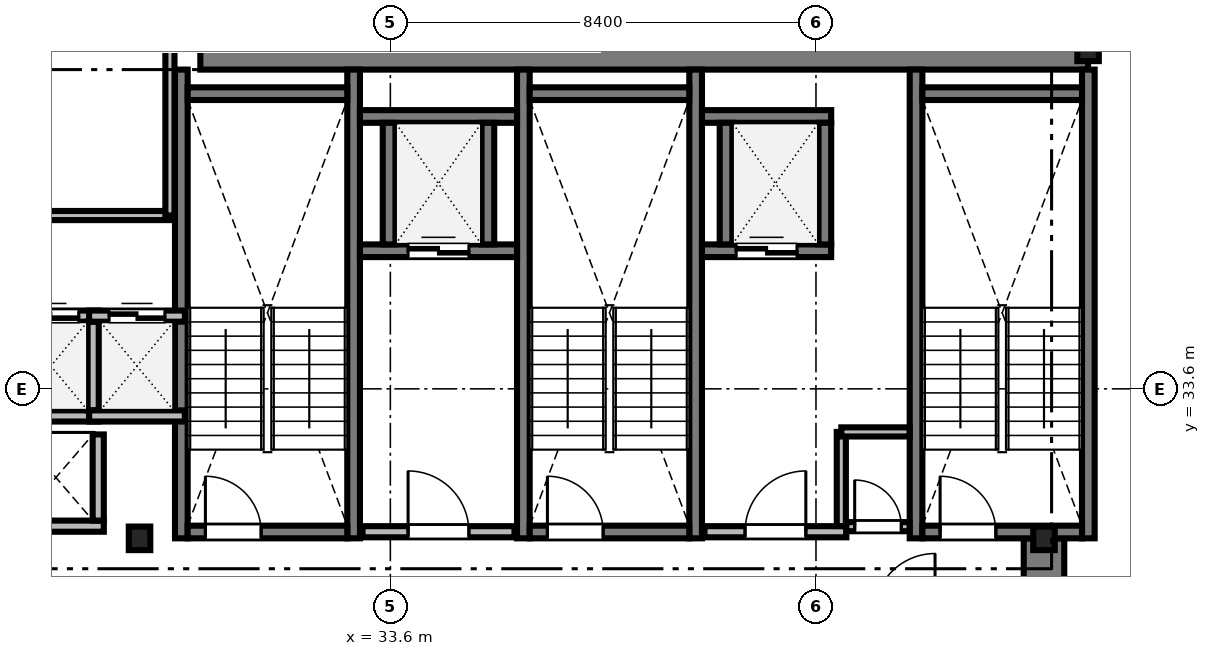
"""IFC4 building model, lengths in metres.
Left out: names, types, materials, properties, quantities, classifications, styles, units other than length and angle.
Written with IfcOpenShell. Run it as: python <this file> out.ifc"""

import sys

from ifc_helpers import new_model, si_unit, direction, frame, frame_2d, origin, origin_2d, place, context, subcontext, project, spatial, rectangle, i_section, extrude, source, transform, mapped, element, fill, save


model = new_model("IFC4")
c1 = context("Model", 3, precision=1e-05, world=origin(), true_north=direction((0.0, 1.0)))
c2 = subcontext(c1, "Body", "Model", "MODEL_VIEW")
j1 = project(units=[si_unit("LENGTHUNIT", "METRE"), si_unit("PLANEANGLEUNIT", "RADIAN")], contexts=[c1])
p1 = place(None, origin())
s1 = spatial("IfcSite", under=j1, at=p1, CompositionType="ELEMENT")
p2 = place(p1, origin())
s2 = spatial("IfcBuilding", under=s1, at=p2, CompositionType="ELEMENT")
p3 = place(p2, frame((0.0, 0.0, 137.2)))
s3 = spatial("IfcBuildingStorey", under=s2, at=p3, CompositionType="ELEMENT", Elevation=137.2)
m1 = source(origin(), c2, "Body", "SweptSolid", [
    extrude(rectangle(XDim=17.52, YDim=0.8, at=frame_2d((8.76, 0.0))), origin(), (0.0, 0.0, 1.0), 3.46),
])
p4 = place(p3, frame((29.85, 40.3, 0.0), z_axis=(0.0, 0.0, 1.0), x_axis=(1.0, 0.0, 0.0)))
e1 = element("IfcWall", 1, at=p4, inside=s3, PredefinedType="SHEAR", context=c2, shape_type="MappedRepresentation", body=[
    mapped(m1, transform((0.0, 0.0, 0.0), scale=1.0)),
])
m2 = source(origin(), c2, "Body", "SweptSolid", [
    extrude(rectangle(XDim=13.15, YDim=0.8, at=frame_2d((6.575, 0.0))), origin(), (0.0, 0.0, 1.0), 3.46),
])
p5 = place(p3, frame((46.5, 17.5, 0.0), z_axis=(0.0, 0.0, 1.0), x_axis=(0.0, 1.0, 0.0)))
e2 = element("IfcWall", 2, at=p5, inside=s3, PredefinedType="SHEAR", context=c2, shape_type="MappedRepresentation", body=[
    mapped(m2, transform((0.0, 0.0, 0.0), scale=1.0)),
])
m3 = source(origin(), c2, "Body", "SweptSolid", [
    extrude(i_section(OverallWidth=0.424, OverallDepth=0.465, WebThickness=0.035, FlangeThickness=0.056, FilletRadius=0.015, at=origin_2d()), origin(), (0.0, 0.0, 1.0), 3.46),
])
for number, where, z_axis, x_axis in (
    (3, (28.65, 30.65, 0.0), (0.0, 0.0, 1.0), (1.0, 0.0, 0.0)),
    (4, (46.5, 30.65, 0.0), (0.0, 0.0, 1.0), (1.0, 0.0, 0.0)),
    (5, (47.37, 40.3, 0.0), (0.0, 0.0, 1.0), (1.0, 0.0, 0.0)),
):
    element("IfcColumn", number, at=place(p3, frame(where, z_axis=z_axis, x_axis=x_axis)), inside=s3, PredefinedType="COLUMN", context=c2, shape_type="MappedRepresentation", body=[
        mapped(m3, transform((0.0, 0.0, 0.0), scale=1.0)),
    ])
m4 = source(origin(), c2, "Body", "SweptSolid", [
    extrude(rectangle(XDim=9.25, YDim=0.25, at=frame_2d((4.625, 0.0))), origin(), (0.0, 0.0, 1.0), 3.5),
])
for number, where, z_axis, x_axis in (
    (6, (29.475, 30.65, 0.0), (0.0, 0.0, 1.0), (0.0, 1.0, 0.0)),
    (7, (32.875, 30.65, 0.0), (0.0, 0.0, 1.0), (0.0, 1.0, 0.0)),
):
    element("IfcWall", number, at=place(p3, frame(where, z_axis=z_axis, x_axis=x_axis)), inside=s3, PredefinedType="SOLIDWALL", context=c2, shape_type="MappedRepresentation", body=[
        mapped(m4, transform((0.0, 0.0, 0.0), scale=1.0)),
    ])
m5 = source(origin(), c2, "Body", "SweptSolid", [
    extrude(rectangle(XDim=3.15, YDim=0.25, at=frame_2d((1.575, 0.0))), origin(), (0.0, 0.0, 1.0), 3.5),
])
p6 = place(p3, frame((29.6, 39.425, 0.0), z_axis=(0.0, 0.0, 1.0), x_axis=(1.0, 0.0, 0.0)))
e8 = element("IfcWall", 8, at=p6, inside=s3, PredefinedType="SOLIDWALL", context=c2, shape_type="MappedRepresentation", body=[
    mapped(m5, transform((0.0, 0.0, 0.0), scale=1.0)),
])
p7 = place(p3, frame((29.6, 30.775, 0.0), z_axis=(0.0, 0.0, 1.0), x_axis=(1.0, 0.0, 0.0)))
e9 = element("IfcWall", 9, at=p7, inside=s3, PredefinedType="SOLIDWALL", context=c2, shape_type="MappedRepresentation", body=[
    mapped(m5, transform((0.0, 0.0, 0.0), scale=1.0)),
])
m6 = source(origin(), c2, "Body", "SweptSolid", [
    extrude(rectangle(XDim=1.1, YDim=2.2, at=frame_2d((0.55, 1.1))), frame((0.0, 0.135, 0.0), z_axis=(0.0, -1.0, 0.0), x_axis=(1.0, 0.0, 0.0)), (0.0, 0.0, 1.0), 0.27),
])
p8 = place(p7, frame((0.35, 0.0, 0.0)))
e10 = element("IfcOpeningElement", 10, at=p8, cuts=e9, PredefinedType="OPENING", context=c2, shape_type="MappedRepresentation", body=[
    mapped(m6, transform((0.0, 0.0, 0.0), scale=1.0)),
])
for number, where, z_axis, x_axis in (
    (11, (36.225, 30.65, 0.0), (0.0, 0.0, 1.0), (0.0, 1.0, 0.0)),
    (12, (39.625, 30.65, 0.0), (0.0, 0.0, 1.0), (0.0, 1.0, 0.0)),
):
    element("IfcWall", number, at=place(p3, frame(where, z_axis=z_axis, x_axis=x_axis)), inside=s3, PredefinedType="SOLIDWALL", context=c2, shape_type="MappedRepresentation", body=[
        mapped(m4, transform((0.0, 0.0, 0.0), scale=1.0)),
    ])
p9 = place(p3, frame((36.35, 39.425, 0.0), z_axis=(0.0, 0.0, 1.0), x_axis=(1.0, 0.0, 0.0)))
e13 = element("IfcWall", 13, at=p9, inside=s3, PredefinedType="SOLIDWALL", context=c2, shape_type="MappedRepresentation", body=[
    mapped(m5, transform((0.0, 0.0, 0.0), scale=1.0)),
])
p10 = place(p3, frame((36.35, 30.775, 0.0), z_axis=(0.0, 0.0, 1.0), x_axis=(1.0, 0.0, 0.0)))
e14 = element("IfcWall", 14, at=p10, inside=s3, PredefinedType="SOLIDWALL", context=c2, shape_type="MappedRepresentation", body=[
    mapped(m5, transform((0.0, 0.0, 0.0), scale=1.0)),
])
p11 = place(p10, frame((0.35, 0.0, 0.0)))
e15 = element("IfcOpeningElement", 15, at=p11, cuts=e14, PredefinedType="OPENING", context=c2, shape_type="MappedRepresentation", body=[
    mapped(m6, transform((0.0, 0.0, 0.0), scale=1.0)),
])
for number, where, z_axis, x_axis in (
    (16, (43.975, 30.65, 0.0), (0.0, 0.0, 1.0), (0.0, 1.0, 0.0)),
    (17, (47.375, 30.65, 0.0), (0.0, 0.0, 1.0), (0.0, 1.0, 0.0)),
):
    element("IfcWall", number, at=place(p3, frame(where, z_axis=z_axis, x_axis=x_axis)), inside=s3, PredefinedType="SOLIDWALL", context=c2, shape_type="MappedRepresentation", body=[
        mapped(m4, transform((0.0, 0.0, 0.0), scale=1.0)),
    ])
p12 = place(p3, frame((44.1, 39.425, 0.0), z_axis=(0.0, 0.0, 1.0), x_axis=(1.0, 0.0, 0.0)))
e18 = element("IfcWall", 18, at=p12, inside=s3, PredefinedType="SOLIDWALL", context=c2, shape_type="MappedRepresentation", body=[
    mapped(m5, transform((0.0, 0.0, 0.0), scale=1.0)),
])
p13 = place(p3, frame((44.1, 30.775, 0.0), z_axis=(0.0, 0.0, 1.0), x_axis=(1.0, 0.0, 0.0)))
e19 = element("IfcWall", 19, at=p13, inside=s3, PredefinedType="SOLIDWALL", context=c2, shape_type="MappedRepresentation", body=[
    mapped(m5, transform((0.0, 0.0, 0.0), scale=1.0)),
])
p14 = place(p13, frame((0.35, 0.0, 0.0)))
e20 = element("IfcOpeningElement", 20, at=p14, cuts=e19, PredefinedType="OPENING", context=c2, shape_type="MappedRepresentation", body=[
    mapped(m6, transform((0.0, 0.0, 0.0), scale=1.0)),
])
m7 = source(origin(), c2, "Body", "SweptSolid", [
    extrude(rectangle(XDim=3.0, YDim=0.22, at=frame_2d((1.5, 0.0))), origin(), (0.0, 0.0, 1.0), 3.46),
])
p15 = place(p3, frame((33.05, 30.78, 0.0), z_axis=(0.0, 0.0, 1.0), x_axis=(1.0, 0.0, 0.0)))
e21 = element("IfcWall", 21, at=p15, inside=s3, PredefinedType="SOLIDWALL", context=c2, shape_type="MappedRepresentation", body=[
    mapped(m7, transform((0.0, 0.0, 0.0), scale=1.0)),
])
m8 = source(origin(), c2, "Body", "SweptSolid", [
    extrude(rectangle(XDim=1.2, YDim=2.2, at=frame_2d((0.6, 1.1))), frame((0.0, 0.12, 0.0), z_axis=(0.0, -1.0, 0.0), x_axis=(1.0, 0.0, 0.0)), (0.0, 0.0, 1.0), 0.24),
])
p16 = place(p15, frame((0.9, 0.0, 0.0)))
e22 = element("IfcOpeningElement", 22, at=p16, cuts=e21, PredefinedType="OPENING", context=c2, shape_type="MappedRepresentation", body=[
    mapped(m8, transform((0.0, 0.0, 0.0), scale=1.0)),
])
m9 = source(origin(), c2, "Body", "SweptSolid", [
    extrude(rectangle(XDim=2.8, YDim=0.22, at=frame_2d((1.4, 0.0))), origin(), (0.0, 0.0, 1.0), 3.46),
])
p17 = place(p3, frame((39.8, 30.78, 0.0), z_axis=(0.0, 0.0, 1.0), x_axis=(1.0, 0.0, 0.0)))
e23 = element("IfcWall", 23, at=p17, inside=s3, PredefinedType="SOLIDWALL", context=c2, shape_type="MappedRepresentation", body=[
    mapped(m9, transform((0.0, 0.0, 0.0), scale=1.0)),
])
p18 = place(p17, frame((0.8, 0.0, 0.0)))
e24 = element("IfcOpeningElement", 24, at=p18, cuts=e23, PredefinedType="OPENING", context=c2, shape_type="MappedRepresentation", body=[
    mapped(m8, transform((0.0, 0.0, 0.0), scale=1.0)),
])
m10 = source(origin(), c2, "Body", "SweptSolid", [
    extrude(rectangle(XDim=1.89, YDim=0.22, at=frame_2d((0.945, 0.0))), origin(), (0.0, 0.0, 1.0), 3.46),
])
p19 = place(p3, frame((25.955, 33.065, 0.0), z_axis=(0.0, 0.0, 1.0), x_axis=(1.0, 0.0, 0.0)))
e25 = element("IfcWall", 25, at=p19, inside=s3, PredefinedType="SOLIDWALL", context=c2, shape_type="MappedRepresentation", body=[
    mapped(m10, transform((0.0, 0.0, 0.0), scale=1.0)),
])
p20 = place(p3, frame((25.955, 35.035, 0.0), z_axis=(0.0, 0.0, 1.0), x_axis=(1.0, 0.0, 0.0)))
e26 = element("IfcWall", 26, at=p20, inside=s3, PredefinedType="SOLIDWALL", context=c2, shape_type="MappedRepresentation", body=[
    mapped(m10, transform((0.0, 0.0, 0.0), scale=1.0)),
])
m11 = source(origin(), c2, "Body", "SweptSolid", [
    extrude(rectangle(XDim=1.1, YDim=2.2, at=frame_2d((0.55, 1.1))), frame((0.0, 0.12, 0.0), z_axis=(0.0, -1.0, 0.0), x_axis=(1.0, 0.0, 0.0)), (0.0, 0.0, 1.0), 0.24),
])
p21 = place(p20, frame((0.395, 0.0, 0.0)))
e27 = element("IfcOpeningElement", 27, at=p21, cuts=e26, PredefinedType="OPENING", context=c2, shape_type="MappedRepresentation", body=[
    mapped(m11, transform((0.0, 0.0, 0.0), scale=1.0)),
])
m12 = source(origin(), c2, "Body", "SweptSolid", [
    extrude(rectangle(XDim=1.75, YDim=0.22, at=frame_2d((0.875, 0.0))), origin(), (0.0, 0.0, 1.0), 3.46),
])
p22 = place(p3, frame((27.735, 33.175, 0.0), z_axis=(0.0, 0.0, 1.0), x_axis=(0.0, 1.0, 0.0)))
e28 = element("IfcWall", 28, at=p22, inside=s3, PredefinedType="SOLIDWALL", context=c2, shape_type="MappedRepresentation", body=[
    mapped(m12, transform((0.0, 0.0, 0.0), scale=1.0)),
])
p23 = place(p3, frame((27.655, 33.065, 0.0), z_axis=(0.0, 0.0, 1.0), x_axis=(1.0, 0.0, 0.0)))
e29 = element("IfcWall", 29, at=p23, inside=s3, PredefinedType="SOLIDWALL", context=c2, shape_type="MappedRepresentation", body=[
    mapped(m10, transform((0.0, 0.0, 0.0), scale=1.0)),
])
p24 = place(p3, frame((27.655, 35.035, 0.0), z_axis=(0.0, 0.0, 1.0), x_axis=(1.0, 0.0, 0.0)))
e30 = element("IfcWall", 30, at=p24, inside=s3, PredefinedType="SOLIDWALL", context=c2, shape_type="MappedRepresentation", body=[
    mapped(m10, transform((0.0, 0.0, 0.0), scale=1.0)),
])
p25 = place(p24, frame((0.395, 0.0, 0.0)))
e31 = element("IfcOpeningElement", 31, at=p25, cuts=e30, PredefinedType="OPENING", context=c2, shape_type="MappedRepresentation", body=[
    mapped(m11, transform((0.0, 0.0, 0.0), scale=1.0)),
])
m13 = source(origin(), c2, "Body", "SweptSolid", [
    extrude(rectangle(XDim=3.1, YDim=0.25, at=frame_2d((1.55, 0.0))), origin(), (0.0, 0.0, 1.0), 3.46),
])
p26 = place(p3, frame((33.0, 36.325, 0.0), z_axis=(0.0, 0.0, 1.0), x_axis=(1.0, 0.0, 0.0)))
e32 = element("IfcWall", 32, at=p26, inside=s3, PredefinedType="SOLIDWALL", context=c2, shape_type="MappedRepresentation", body=[
    mapped(m13, transform((0.0, 0.0, 0.0), scale=1.0)),
])
m14 = source(origin(), c2, "Body", "SweptSolid", [
    extrude(rectangle(XDim=1.2, YDim=2.25, at=frame_2d((0.6, 1.125))), frame((0.0, 0.135, 0.0), z_axis=(0.0, -1.0, 0.0), x_axis=(1.0, 0.0, 0.0)), (0.0, 0.0, 1.0), 0.27),
])
p27 = place(p26, frame((0.95, 0.0, 0.0)))
e33 = element("IfcOpeningElement", 33, at=p27, cuts=e32, PredefinedType="OPENING", context=c2, shape_type="MappedRepresentation", body=[
    mapped(m14, transform((0.0, 0.0, 0.0), scale=1.0)),
])
p28 = place(p3, frame((33.0, 38.975, 0.0), z_axis=(0.0, 0.0, 1.0), x_axis=(1.0, 0.0, 0.0)))
e34 = element("IfcWall", 34, at=p28, inside=s3, PredefinedType="SOLIDWALL", context=c2, shape_type="MappedRepresentation", body=[
    mapped(m13, transform((0.0, 0.0, 0.0), scale=1.0)),
])
m15 = source(origin(), c2, "Body", "SweptSolid", [
    extrude(rectangle(XDim=2.4, YDim=0.25, at=frame_2d((1.2, 0.0))), origin(), (0.0, 0.0, 1.0), 3.46),
])
for number, where, z_axis, x_axis in (
    (35, (33.575, 36.45, 0.0), (0.0, 0.0, 1.0), (0.0, 1.0, 0.0)),
    (36, (35.525, 36.45, 0.0), (0.0, 0.0, 1.0), (0.0, 1.0, 0.0)),
):
    element("IfcWall", number, at=place(p3, frame(where, z_axis=z_axis, x_axis=x_axis)), inside=s3, PredefinedType="SOLIDWALL", context=c2, shape_type="MappedRepresentation", body=[
        mapped(m15, transform((0.0, 0.0, 0.0), scale=1.0)),
    ])
m16 = source(origin(), c2, "Body", "SweptSolid", [
    extrude(rectangle(XDim=2.55, YDim=0.25, at=frame_2d((1.275, 0.0))), origin(), (0.0, 0.0, 1.0), 3.46),
])
p29 = place(p3, frame((39.75, 36.325, 0.0), z_axis=(0.0, 0.0, 1.0), x_axis=(1.0, 0.0, 0.0)))
e37 = element("IfcWall", 37, at=p29, inside=s3, PredefinedType="SOLIDWALL", context=c2, shape_type="MappedRepresentation", body=[
    mapped(m16, transform((0.0, 0.0, 0.0), scale=1.0)),
])
p30 = place(p29, frame((0.675, 0.0, 0.0)))
e38 = element("IfcOpeningElement", 38, at=p30, cuts=e37, PredefinedType="OPENING", context=c2, shape_type="MappedRepresentation", body=[
    mapped(m14, transform((0.0, 0.0, 0.0), scale=1.0)),
])
p31 = place(p3, frame((39.75, 38.975, 0.0), z_axis=(0.0, 0.0, 1.0), x_axis=(1.0, 0.0, 0.0)))
e39 = element("IfcWall", 39, at=p31, inside=s3, PredefinedType="SOLIDWALL", context=c2, shape_type="MappedRepresentation", body=[
    mapped(m16, transform((0.0, 0.0, 0.0), scale=1.0)),
])
for number, where, z_axis, x_axis in (
    (40, (40.225, 36.45, 0.0), (0.0, 0.0, 1.0), (0.0, 1.0, 0.0)),
    (41, (42.175, 36.45, 0.0), (0.0, 0.0, 1.0), (0.0, 1.0, 0.0)),
):
    element("IfcWall", number, at=place(p3, frame(where, z_axis=z_axis, x_axis=x_axis)), inside=s3, PredefinedType="SOLIDWALL", context=c2, shape_type="MappedRepresentation", body=[
        mapped(m15, transform((0.0, 0.0, 0.0), scale=1.0)),
    ])
m17 = source(origin(), c2, "Body", "SweptSolid", [
    extrude(rectangle(XDim=1.89, YDim=0.22, at=frame_2d((0.945, 0.0))), origin(), (0.0, 0.0, 1.0), 3.46),
])
p32 = place(p3, frame((26.055, 30.89, 0.0), z_axis=(0.0, 0.0, 1.0), x_axis=(1.0, 0.0, 0.0)))
e42 = element("IfcWall", 42, at=p32, inside=s3, PredefinedType="SOLIDWALL", context=c2, shape_type="MappedRepresentation", body=[
    mapped(m17, transform((0.0, 0.0, 0.0), scale=1.0)),
])
m18 = source(origin(), c2, "Body", "SweptSolid", [
    extrude(rectangle(XDim=1.7, YDim=0.22, at=frame_2d((0.85, 0.0))), origin(), (0.0, 0.0, 1.0), 3.46),
])
p33 = place(p3, frame((27.835, 31.0, 0.0), z_axis=(0.0, 0.0, 1.0), x_axis=(0.0, 1.0, 0.0)))
e43 = element("IfcWall", 43, at=p33, inside=s3, PredefinedType="SOLIDWALL", context=c2, shape_type="MappedRepresentation", body=[
    mapped(m18, transform((0.0, 0.0, 0.0), scale=1.0)),
])
m19 = source(origin(), c2, "Body", "SweptSolid", [
    extrude(rectangle(XDim=22.328, YDim=0.18, at=frame_2d((11.164, 0.0))), origin(), (0.0, 0.0, 1.0), 2.702),
])
p34 = place(p3, frame((6.922, 37.02, 0.0), z_axis=(0.0, 0.0, 1.0), x_axis=(1.0, 0.0, 0.0)))
e44 = element("IfcWall", 44, at=p34, inside=s3, PredefinedType="PARTITIONING", context=c2, shape_type="MappedRepresentation", body=[
    mapped(m19, transform((0.0, 0.0, 0.0), scale=1.0)),
])
m20 = source(origin(), c2, "Body", "SweptSolid", [
    extrude(rectangle(XDim=1.05, YDim=2.2, at=frame_2d((0.525, 1.1))), frame((0.0, 0.1, 0.0), z_axis=(0.0, -1.0, 0.0), x_axis=(1.0, 0.0, 0.0)), (0.0, 0.0, 1.0), 0.2),
])
p35 = place(p34, frame((14.928, 0.0, 0.0)))
e45 = element("IfcOpeningElement", 45, at=p35, cuts=e44, PredefinedType="OPENING", context=c2, shape_type="MappedRepresentation", body=[
    mapped(m20, transform((0.0, 0.0, 0.0), scale=1.0)),
])
m21 = source(origin(), c2, "Body", "SweptSolid", [
    extrude(rectangle(XDim=1.248, YDim=0.18, at=frame_2d((0.624, 0.0))), origin(), (0.0, 0.0, 1.0), 3.46),
])
p36 = place(p3, frame((42.6, 30.88, 0.0), z_axis=(0.0, 0.0, 1.0), x_axis=(1.0, 0.0, 0.0)))
e46 = element("IfcWall", 46, at=p36, inside=s3, PredefinedType="PARTITIONING", context=c2, shape_type="MappedRepresentation", body=[
    mapped(m21, transform((0.0, 0.0, 0.0), scale=1.0)),
])
m22 = source(origin(), c2, "Body", "SweptSolid", [
    extrude(rectangle(XDim=0.92, YDim=2.1, at=frame_2d((0.46, 1.05))), frame((0.0, 0.1, 0.0), z_axis=(0.0, -1.0, 0.0), x_axis=(1.0, 0.0, 0.0)), (0.0, 0.0, 1.0), 0.2),
])
p37 = place(p36, frame((0.164, 0.0, 0.0)))
e47 = element("IfcOpeningElement", 47, at=p37, cuts=e46, PredefinedType="OPENING", context=c2, shape_type="MappedRepresentation", body=[
    mapped(m22, transform((0.0, 0.0, 0.0), scale=1.0)),
])
m23 = source(origin(), c2, "Body", "SweptSolid", [
    extrude(rectangle(XDim=11.45, YDim=0.18, at=frame_2d((5.725, 0.0))), origin(), (0.0, 0.0, 1.0), 2.702),
])
p38 = place(p3, frame((29.25, 37.02, 0.0), z_axis=(0.0, 0.0, 1.0), x_axis=(0.0, 1.0, 0.0)))
e48 = element("IfcWall", 48, at=p38, inside=s3, PredefinedType="PARTITIONING", context=c2, shape_type="MappedRepresentation", body=[
    mapped(m23, transform((0.0, 0.0, 0.0), scale=1.0)),
])
m24 = source(origin(), c2, "Body", "SweptSolid", [
    extrude(rectangle(XDim=1.858, YDim=0.18, at=frame_2d((0.929, 0.0))), origin(), (0.0, 0.0, 1.0), 3.46),
])
p39 = place(p3, frame((42.5, 30.892, 0.0), z_axis=(0.0, 0.0, 1.0), x_axis=(0.0, 1.0, 0.0)))
e49 = element("IfcWall", 49, at=p39, inside=s3, PredefinedType="PARTITIONING", context=c2, shape_type="MappedRepresentation", body=[
    mapped(m24, transform((0.0, 0.0, 0.0), scale=1.0)),
])
m25 = source(origin(), c2, "Body", "SweptSolid", [
    extrude(rectangle(XDim=1.348, YDim=0.18, at=frame_2d((0.674, 0.0))), origin(), (0.0, 0.0, 1.0), 3.46),
])
p40 = place(p3, frame((42.5, 32.75, 0.0), z_axis=(0.0, 0.0, 1.0), x_axis=(1.0, 0.0, 0.0)))
e50 = element("IfcWall", 50, at=p40, inside=s3, PredefinedType="PARTITIONING", context=c2, shape_type="MappedRepresentation", body=[
    mapped(m25, transform((0.0, 0.0, 0.0), scale=1.0)),
])
m26 = source(origin(), c2, "Body", "SweptSolid", [
    extrude(rectangle(XDim=1.1, YDim=2.2, at=frame_2d((0.55, 1.1))), frame((0.0, 0.025, 0.0), z_axis=(0.0, -1.0, 0.0), x_axis=(1.0, 0.0, 0.0)), (0.0, 0.0, 1.0), 0.05),
])
p41 = place(p8, origin())
e51 = element("IfcDoor", 51, at=p41, inside=s3, OperationType="SINGLE_SWING_LEFT", PredefinedType="DOOR", context=c2, shape_type="MappedRepresentation", body=[
    mapped(m26, transform((0.0, 0.0, 0.0), scale=1.0)),
])
fill(e10, e51)
p42 = place(p11, origin())
e52 = element("IfcDoor", 52, at=p42, inside=s3, OperationType="SINGLE_SWING_LEFT", PredefinedType="DOOR", context=c2, shape_type="MappedRepresentation", body=[
    mapped(m26, transform((0.0, 0.0, 0.0), scale=1.0)),
])
fill(e15, e52)
p43 = place(p14, origin())
e53 = element("IfcDoor", 53, at=p43, inside=s3, OperationType="SINGLE_SWING_LEFT", PredefinedType="DOOR", context=c2, shape_type="MappedRepresentation", body=[
    mapped(m26, transform((0.0, 0.0, 0.0), scale=1.0)),
])
fill(e20, e53)
m27 = source(origin(), c2, "Body", "SweptSolid", [
    extrude(rectangle(XDim=1.2, YDim=2.2, at=frame_2d((0.6, 1.1))), frame((0.0, 0.025, 0.0), z_axis=(0.0, -1.0, 0.0), x_axis=(1.0, 0.0, 0.0)), (0.0, 0.0, 1.0), 0.05),
])
p44 = place(p16, origin())
e54 = element("IfcDoor", 54, at=p44, inside=s3, OperationType="SINGLE_SWING_LEFT", PredefinedType="DOOR", context=c2, shape_type="MappedRepresentation", body=[
    mapped(m27, transform((0.0, 0.0, 0.0), scale=1.0)),
])
fill(e22, e54)
p45 = place(p18, origin())
e55 = element("IfcDoor", 55, at=p45, inside=s3, OperationType="SINGLE_SWING_RIGHT", PredefinedType="DOOR", context=c2, shape_type="MappedRepresentation", body=[
    mapped(m27, transform((0.0, 0.0, 0.0), scale=1.0)),
])
fill(e24, e55)
p46 = place(p21, origin())
e56 = element("IfcDoor", 56, at=p46, inside=s3, OperationType="DOUBLE_DOOR_SLIDING", PredefinedType="DOOR", context=c2, shape_type="MappedRepresentation", body=[
    mapped(m26, transform((0.0, 0.0, 0.0), scale=1.0)),
])
fill(e27, e56)
p47 = place(p25, origin())
e57 = element("IfcDoor", 57, at=p47, inside=s3, OperationType="DOUBLE_DOOR_SLIDING", PredefinedType="DOOR", context=c2, shape_type="MappedRepresentation", body=[
    mapped(m26, transform((0.0, 0.0, 0.0), scale=1.0)),
])
fill(e31, e57)
m28 = source(origin(), c2, "Body", "SweptSolid", [
    extrude(rectangle(XDim=1.2, YDim=2.25, at=frame_2d((0.6, 1.125))), frame((0.0, 0.025, 0.0), z_axis=(0.0, -1.0, 0.0), x_axis=(1.0, 0.0, 0.0)), (0.0, 0.0, 1.0), 0.05),
])
p48 = place(p27, origin())
e58 = element("IfcDoor", 58, at=p48, inside=s3, OperationType="DOUBLE_DOOR_SLIDING", PredefinedType="DOOR", context=c2, shape_type="MappedRepresentation", body=[
    mapped(m28, transform((0.0, 0.0, 0.0), scale=1.0)),
])
fill(e33, e58)
p49 = place(p30, origin())
e59 = element("IfcDoor", 59, at=p49, inside=s3, OperationType="DOUBLE_DOOR_SLIDING", PredefinedType="DOOR", context=c2, shape_type="MappedRepresentation", body=[
    mapped(m28, transform((0.0, 0.0, 0.0), scale=1.0)),
])
fill(e38, e59)
m29 = source(origin(), c2, "Body", "SweptSolid", [
    extrude(rectangle(XDim=0.92, YDim=2.1, at=frame_2d((0.46, 1.05))), frame((0.0, 0.025, 0.0), z_axis=(0.0, -1.0, 0.0), x_axis=(1.0, 0.0, 0.0)), (0.0, 0.0, 1.0), 0.05),
])
p50 = place(p37, origin())
e60 = element("IfcDoor", 60, at=p50, inside=s3, OperationType="SINGLE_SWING_LEFT", PredefinedType="DOOR", context=c2, shape_type="MappedRepresentation", body=[
    mapped(m29, transform((0.0, 0.0, 0.0), scale=1.0)),
])
fill(e47, e60)
save(model, sys.argv[1])
